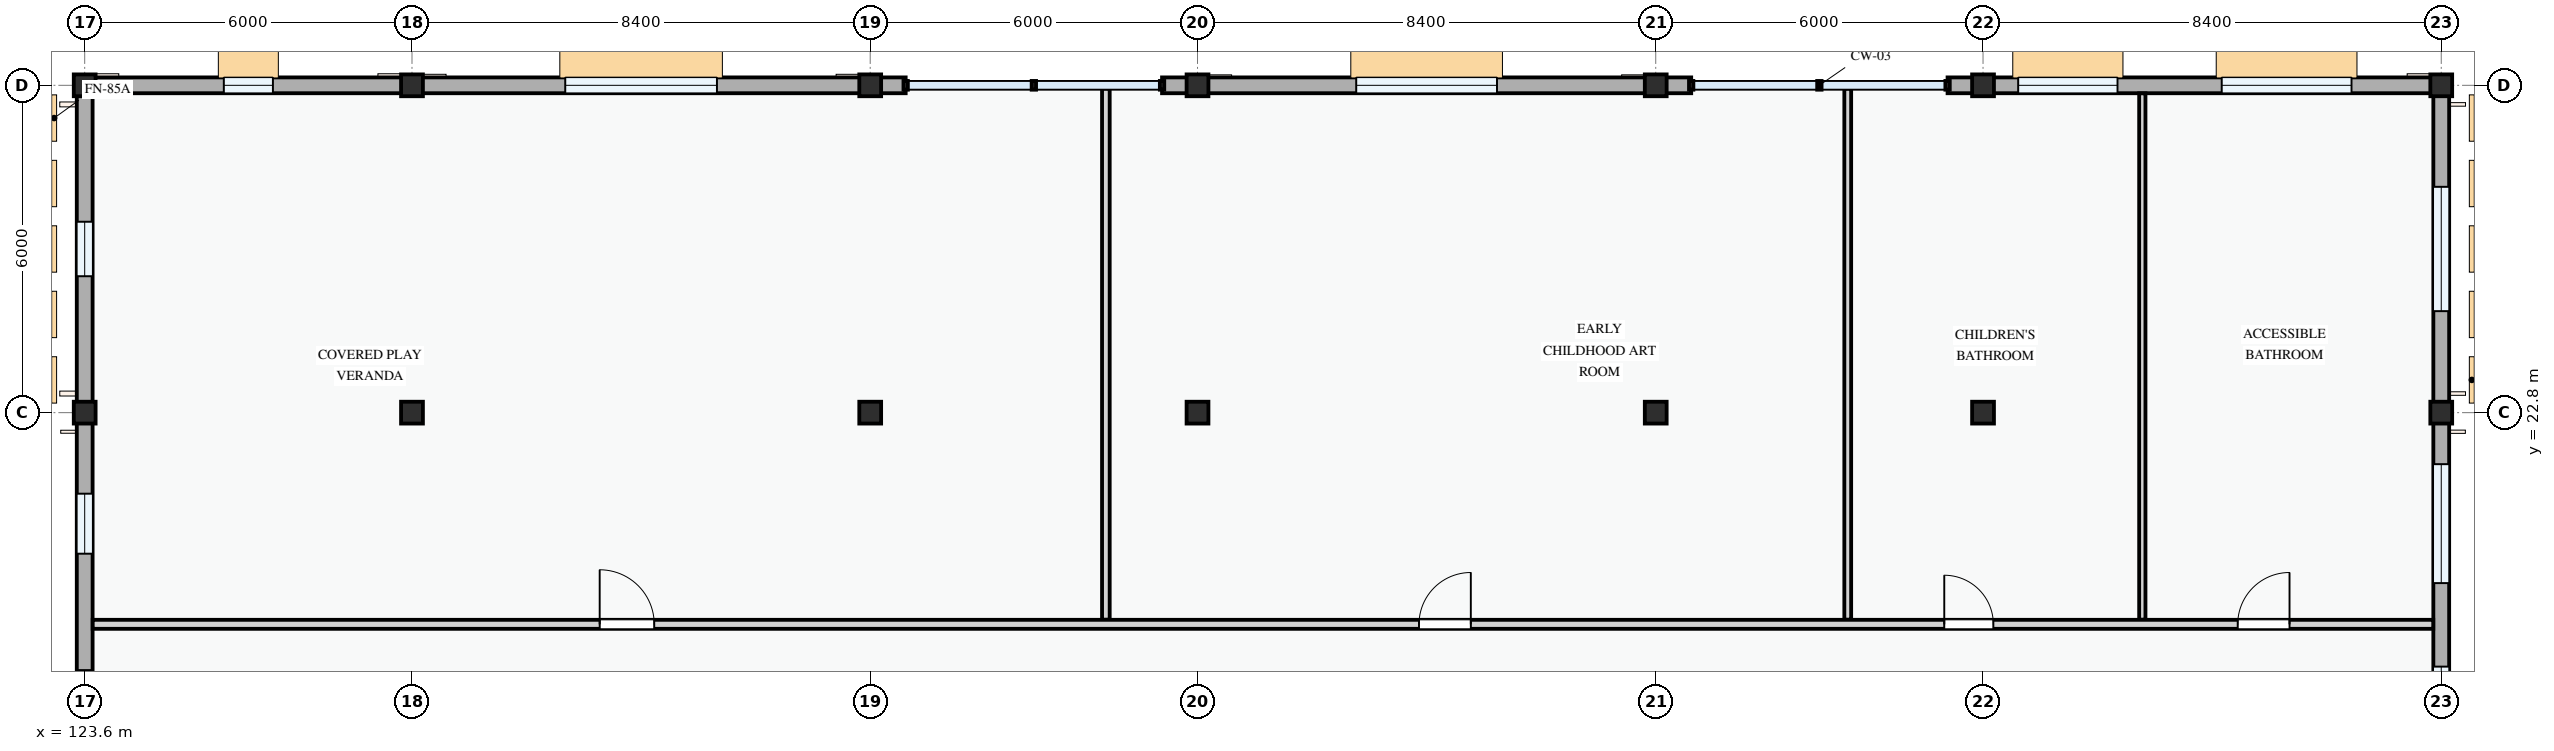
"""IFC4 building model, lengths in metres.
Left out: names, types, materials, properties, quantities, classifications, styles, units other than length and angle.
Written with IfcOpenShell. Run it as: python <this file> out.ifc"""

import sys

from ifc_helpers import new_model, si_unit, direction, frame, frame_2d, origin, origin_2d, place, context, subcontext, project, spatial, rectangle, extrude, element, fill, save


model = new_model("IFC4")
c1 = context("Model", 3, precision=1e-05, world=origin(), true_north=direction((0.0, 1.0)))
c2 = subcontext(c1, "Body", "Model", "MODEL_VIEW")
j1 = project(units=[si_unit("LENGTHUNIT", "METRE"), si_unit("PLANEANGLEUNIT", "RADIAN")], contexts=[c1])
p1 = place(None, origin())
s1 = spatial("IfcSite", under=j1, at=p1, CompositionType="ELEMENT")
p2 = place(p1, origin())
s2 = spatial("IfcBuilding", under=s1, at=p2, CompositionType="ELEMENT")
p3 = place(p2, frame((0.0, 0.0, 4.5)))
s3 = spatial("IfcBuildingStorey", under=s2, at=p3, CompositionType="ELEMENT", Elevation=4.5)
for number, where, z_axis, x_axis in (
    (1, (123.6, 22.8, 0.0), (0.0, 0.0, 1.0), (1.0, 0.0, 0.0)),
    (2, (123.6, 28.8, 0.0), (0.0, 0.0, 1.0), (1.0, 0.0, 0.0)),
    (3, (129.6, 22.8, 0.0), (0.0, 0.0, 1.0), (1.0, 0.0, 0.0)),
    (4, (129.6, 28.8, 0.0), (0.0, 0.0, 1.0), (1.0, 0.0, 0.0)),
    (5, (138.0, 22.8, 0.0), (0.0, 0.0, 1.0), (1.0, 0.0, 0.0)),
    (6, (138.0, 28.8, 0.0), (0.0, 0.0, 1.0), (1.0, 0.0, 0.0)),
    (7, (144.0, 22.8, 0.0), (0.0, 0.0, 1.0), (1.0, 0.0, 0.0)),
    (8, (144.0, 28.8, 0.0), (0.0, 0.0, 1.0), (1.0, 0.0, 0.0)),
    (9, (152.4, 22.8, 0.0), (0.0, 0.0, 1.0), (1.0, 0.0, 0.0)),
    (10, (152.4, 28.8, 0.0), (0.0, 0.0, 1.0), (1.0, 0.0, 0.0)),
    (11, (158.4, 22.8, 0.0), (0.0, 0.0, 1.0), (1.0, 0.0, 0.0)),
    (12, (158.4, 28.8, 0.0), (0.0, 0.0, 1.0), (1.0, 0.0, 0.0)),
    (13, (166.8, 22.8, 0.0), (0.0, 0.0, 1.0), (1.0, 0.0, 0.0)),
    (14, (166.8, 28.8, 0.0), (0.0, 0.0, 1.0), (1.0, 0.0, 0.0)),
):
    element("IfcColumn", number, at=place(p3, frame(where, z_axis=z_axis, x_axis=x_axis)), inside=s3, PredefinedType="COLUMN", context=c2, shape_type="SweptSolid", body=[
        extrude(rectangle(XDim=0.4, YDim=0.4, at=origin_2d()), origin(), (0.0, 0.0, 1.0), 3.6),
    ])
p4 = place(p3, frame((166.8, 14.4, 0.0), z_axis=(0.0, 0.0, 1.0), x_axis=(0.0, 1.0, 0.0)))
e15 = element("IfcWall", 15, at=p4, inside=s3, PredefinedType="STANDARD", context=c2, shape_type="SweptSolid", body=[
    extrude(rectangle(XDim=8.4, YDim=0.29, at=frame_2d((4.2, 0.0))), origin(), (0.0, 0.0, 1.0), 2.725),
])
p5 = place(p4, frame((2.195, 0.0, 0.72)))
e16 = element("IfcOpeningElement", 16, at=p5, cuts=e15, PredefinedType="OPENING", context=c2, shape_type="SweptSolid", body=[
    extrude(rectangle(XDim=1.55, YDim=1.4, at=frame_2d((0.775, 0.7))), frame((0.0, 0.155, 0.0), z_axis=(0.0, -1.0, 0.0), x_axis=(1.0, 0.0, 0.0)), (0.0, 0.0, 1.0), 0.31),
])
p6 = place(p4, frame((5.275, 0.0, 0.72)))
e17 = element("IfcOpeningElement", 17, at=p6, cuts=e15, PredefinedType="OPENING", context=c2, shape_type="SweptSolid", body=[
    extrude(rectangle(XDim=2.18, YDim=1.48, at=frame_2d((1.09, 0.74))), frame((0.0, 0.155, 0.0), z_axis=(0.0, -1.0, 0.0), x_axis=(1.0, 0.0, 0.0)), (0.0, 0.0, 1.0), 0.31),
])
p7 = place(p3, frame((166.8, 22.8, 0.0), z_axis=(0.0, 0.0, 1.0), x_axis=(0.0, 1.0, 0.0)))
e18 = element("IfcWall", 18, at=p7, inside=s3, PredefinedType="STANDARD", context=c2, shape_type="SweptSolid", body=[
    extrude(rectangle(XDim=6.0, YDim=0.29, at=frame_2d((3.0, 0.0))), origin(), (0.0, 0.0, 1.0), 2.875),
])
p8 = place(p7, frame((1.86, 0.0, 0.72)))
e19 = element("IfcOpeningElement", 19, at=p8, cuts=e18, PredefinedType="OPENING", context=c2, shape_type="SweptSolid", body=[
    extrude(rectangle(XDim=2.28, YDim=1.46, at=frame_2d((1.14, 0.73))), frame((0.0, 0.155, 0.0), z_axis=(0.0, -1.0, 0.0), x_axis=(1.0, 0.0, 0.0)), (0.0, 0.0, 1.0), 0.31),
])
p9 = place(p3, frame((166.8, 28.8, 0.0), z_axis=(0.0, 0.0, 1.0), x_axis=(-1.0, 0.0, 0.0)))
e20 = element("IfcWall", 20, at=p9, inside=s3, PredefinedType="STANDARD", context=c2, shape_type="SweptSolid", body=[
    extrude(rectangle(XDim=8.4, YDim=0.29, at=frame_2d((4.2, 0.0))), origin(), (0.0, 0.0, 1.0), 2.675),
])
p10 = place(p9, frame((1.645, 0.0, 0.72)))
e21 = element("IfcOpeningElement", 21, at=p10, cuts=e20, PredefinedType="OPENING", context=c2, shape_type="SweptSolid", body=[
    extrude(rectangle(XDim=2.38, YDim=1.48, at=frame_2d((1.19, 0.74))), frame((0.0, 0.155, 0.0), z_axis=(0.0, -1.0, 0.0), x_axis=(1.0, 0.0, 0.0)), (0.0, 0.0, 1.0), 0.31),
])
p11 = place(p9, frame((5.935, 0.0, 0.72)))
e22 = element("IfcOpeningElement", 22, at=p11, cuts=e20, PredefinedType="OPENING", context=c2, shape_type="SweptSolid", body=[
    extrude(rectangle(XDim=1.82, YDim=1.46, at=frame_2d((0.91, 0.73))), frame((0.0, 0.155, 0.0), z_axis=(0.0, -1.0, 0.0), x_axis=(1.0, 0.0, 0.0)), (0.0, 0.0, 1.0), 0.31),
])
p12 = place(p3, frame((158.4, 28.8, 0.0), z_axis=(0.0, 0.0, 1.0), x_axis=(-1.0, 0.0, 0.0)))
e23 = element("IfcWall", 23, at=p12, inside=s3, PredefinedType="STANDARD", context=c2, shape_type="SweptSolid", body=[
    extrude(rectangle(XDim=0.65, YDim=0.29, at=frame_2d((0.325, 0.0))), origin(), (0.0, 0.0, 1.0), 2.775),
])
p13 = place(p3, frame((153.05, 28.8, 0.0), z_axis=(0.0, 0.0, 1.0), x_axis=(-1.0, 0.0, 0.0)))
e24 = element("IfcWall", 24, at=p13, inside=s3, PredefinedType="STANDARD", context=c2, shape_type="SweptSolid", body=[
    extrude(rectangle(XDim=0.65, YDim=0.29, at=frame_2d((0.325, 0.0))), origin(), (0.0, 0.0, 1.0), 2.775),
])
p14 = place(p3, frame((152.4, 28.8, 0.0), z_axis=(0.0, 0.0, 1.0), x_axis=(-1.0, 0.0, 0.0)))
e25 = element("IfcWall", 25, at=p14, inside=s3, PredefinedType="STANDARD", context=c2, shape_type="SweptSolid", body=[
    extrude(rectangle(XDim=8.4, YDim=0.29, at=frame_2d((4.2, 0.0))), origin(), (0.0, 0.0, 1.0), 2.675),
])
p15 = place(p14, frame((2.91, 0.0, 0.72)))
e26 = element("IfcOpeningElement", 26, at=p15, cuts=e25, PredefinedType="OPENING", context=c2, shape_type="SweptSolid", body=[
    extrude(rectangle(XDim=2.58, YDim=1.48, at=frame_2d((1.29, 0.74))), frame((0.0, 0.155, 0.0), z_axis=(0.0, -1.0, 0.0), x_axis=(1.0, 0.0, 0.0)), (0.0, 0.0, 1.0), 0.31),
])
for number, where, z_axis, x_axis in (
    (27, (144.0, 28.8, 0.0), (0.0, 0.0, 1.0), (-1.0, 0.0, 0.0)),
    (28, (138.65, 28.8, 0.0), (0.0, 0.0, 1.0), (-1.0, 0.0, 0.0)),
):
    element("IfcWall", number, at=place(p3, frame(where, z_axis=z_axis, x_axis=x_axis)), inside=s3, PredefinedType="STANDARD", context=c2, shape_type="SweptSolid", body=[
        extrude(rectangle(XDim=0.65, YDim=0.29, at=frame_2d((0.325, 0.0))), origin(), (0.0, 0.0, 1.0), 2.775),
    ])
p16 = place(p3, frame((138.0, 28.8, 0.0), z_axis=(0.0, 0.0, 1.0), x_axis=(-1.0, 0.0, 0.0)))
e29 = element("IfcWall", 29, at=p16, inside=s3, PredefinedType="STANDARD", context=c2, shape_type="SweptSolid", body=[
    extrude(rectangle(XDim=8.4, YDim=0.29, at=frame_2d((4.2, 0.0))), origin(), (0.0, 0.0, 1.0), 2.675),
])
p17 = place(p16, frame((2.81, 0.0, 0.72)))
e30 = element("IfcOpeningElement", 30, at=p17, cuts=e29, PredefinedType="OPENING", context=c2, shape_type="SweptSolid", body=[
    extrude(rectangle(XDim=2.78, YDim=1.48, at=frame_2d((1.39, 0.74))), frame((0.0, 0.155, 0.0), z_axis=(0.0, -1.0, 0.0), x_axis=(1.0, 0.0, 0.0)), (0.0, 0.0, 1.0), 0.31),
])
p18 = place(p3, frame((129.6, 28.8, 0.0), z_axis=(0.0, 0.0, 1.0), x_axis=(-1.0, 0.0, 0.0)))
e31 = element("IfcWall", 31, at=p18, inside=s3, PredefinedType="STANDARD", context=c2, shape_type="SweptSolid", body=[
    extrude(rectangle(XDim=6.0, YDim=0.29, at=frame_2d((3.0, 0.0))), origin(), (0.0, 0.0, 1.0), 2.775),
])
p19 = place(p18, frame((2.55, 0.0, 0.72)))
e32 = element("IfcOpeningElement", 32, at=p19, cuts=e31, PredefinedType="OPENING", context=c2, shape_type="SweptSolid", body=[
    extrude(rectangle(XDim=0.9, YDim=1.2, at=frame_2d((0.45, 0.6))), frame((0.0, 0.155, 0.0), z_axis=(0.0, -1.0, 0.0), x_axis=(1.0, 0.0, 0.0)), (0.0, 0.0, 1.0), 0.31),
])
p20 = place(p3, frame((123.6, 28.8, 0.0), z_axis=(0.0, 0.0, 1.0), x_axis=(0.0, -1.0, 0.0)))
e33 = element("IfcWall", 33, at=p20, inside=s3, PredefinedType="STANDARD", context=c2, shape_type="SweptSolid", body=[
    extrude(rectangle(XDim=6.0, YDim=0.29, at=frame_2d((3.0, 0.0))), origin(), (0.0, 0.0, 1.0), 2.875),
])
p21 = place(p20, frame((2.5, 0.0, 0.72)))
e34 = element("IfcOpeningElement", 34, at=p21, cuts=e33, PredefinedType="OPENING", context=c2, shape_type="SweptSolid", body=[
    extrude(rectangle(XDim=1.0, YDim=1.25, at=frame_2d((0.5, 0.625))), frame((0.0, 0.155, 0.0), z_axis=(0.0, -1.0, 0.0), x_axis=(1.0, 0.0, 0.0)), (0.0, 0.0, 1.0), 0.31),
])
p22 = place(p3, frame((123.6, 22.8, 0.0), z_axis=(0.0, 0.0, 1.0), x_axis=(0.0, -1.0, 0.0)))
e35 = element("IfcWall", 35, at=p22, inside=s3, PredefinedType="STANDARD", context=c2, shape_type="SweptSolid", body=[
    extrude(rectangle(XDim=8.4, YDim=0.29, at=frame_2d((4.2, 0.0))), origin(), (0.0, 0.0, 1.0), 2.725),
])
p23 = place(p22, frame((1.485, 0.0, 0.72)))
e36 = element("IfcOpeningElement", 36, at=p23, cuts=e35, PredefinedType="OPENING", context=c2, shape_type="SweptSolid", body=[
    extrude(rectangle(XDim=1.1, YDim=1.3, at=frame_2d((0.55, 0.65))), frame((0.0, 0.155, 0.0), z_axis=(0.0, -1.0, 0.0), x_axis=(1.0, 0.0, 0.0)), (0.0, 0.0, 1.0), 0.31),
])
p24 = place(p22, frame((4.72, 0.0, 0.72)))
e37 = element("IfcOpeningElement", 37, at=p24, cuts=e35, PredefinedType="OPENING", context=c2, shape_type="SweptSolid", body=[
    extrude(rectangle(XDim=1.42, YDim=1.38, at=frame_2d((0.71, 0.69))), frame((0.0, 0.155, 0.0), z_axis=(0.0, -1.0, 0.0), x_axis=(1.0, 0.0, 0.0)), (0.0, 0.0, 1.0), 0.31),
])
p25 = place(p3, frame((142.32, 19.004, 0.0), z_axis=(0.0, 0.0, 1.0), x_axis=(0.0, 1.0, 0.0)))
e38 = element("IfcWall", 38, at=p25, inside=s3, PredefinedType="PARTITIONING", context=c2, shape_type="SweptSolid", body=[
    extrude(rectangle(XDim=9.736, YDim=0.14, at=frame_2d((4.868, 0.0))), origin(), (0.0, 0.0, 1.0), 3.3),
])
p26 = place(p3, frame((155.92, 19.004, 0.0), z_axis=(0.0, 0.0, 1.0), x_axis=(0.0, 1.0, 0.0)))
e39 = element("IfcWall", 39, at=p26, inside=s3, PredefinedType="PARTITIONING", context=c2, shape_type="SweptSolid", body=[
    extrude(rectangle(XDim=9.736, YDim=0.125, at=frame_2d((4.868, 0.0))), origin(), (0.0, 0.0, 1.0), 3.3),
])
p27 = place(p3, frame((161.32, 19.004, 0.0), z_axis=(0.0, 0.0, 1.0), x_axis=(0.0, 1.0, 0.0)))
e40 = element("IfcWall", 40, at=p27, inside=s3, PredefinedType="PARTITIONING", context=c2, shape_type="SweptSolid", body=[
    extrude(rectangle(XDim=9.649, YDim=0.115, at=frame_2d((4.824, 0.0))), origin(), (0.0, 0.0, 1.0), 3.3),
])
p28 = place(p3, frame((123.747, 18.92, 0.0), z_axis=(0.0, 0.0, 1.0), x_axis=(1.0, 0.0, 0.0)))
e41 = element("IfcWall", 41, at=p28, inside=s3, PredefinedType="PARTITIONING", context=c2, shape_type="SweptSolid", body=[
    extrude(rectangle(XDim=42.906, YDim=0.165, at=frame_2d((21.453, 0.0))), origin(), (0.0, 0.0, 1.0), 3.3),
])
p29 = place(p28, frame((9.294, 0.0, 0.0)))
e42 = element("IfcOpeningElement", 42, at=p29, cuts=e41, PredefinedType="OPENING", context=c2, shape_type="SweptSolid", body=[
    extrude(rectangle(XDim=1.0, YDim=2.1, at=frame_2d((0.5, 1.05))), frame((0.0, 0.093, 0.0), z_axis=(0.0, -1.0, 0.0), x_axis=(1.0, 0.0, 0.0)), (0.0, 0.0, 1.0), 0.185),
])
p30 = place(p28, frame((24.313, 0.0, 0.0)))
e43 = element("IfcOpeningElement", 43, at=p30, cuts=e41, PredefinedType="OPENING", context=c2, shape_type="SweptSolid", body=[
    extrude(rectangle(XDim=0.95, YDim=2.1, at=frame_2d((0.475, 1.05))), frame((0.0, 0.093, 0.0), z_axis=(0.0, -1.0, 0.0), x_axis=(1.0, 0.0, 0.0)), (0.0, 0.0, 1.0), 0.185),
])
p31 = place(p28, frame((33.942, 0.0, 0.0)))
e44 = element("IfcOpeningElement", 44, at=p31, cuts=e41, PredefinedType="OPENING", context=c2, shape_type="SweptSolid", body=[
    extrude(rectangle(XDim=0.9, YDim=2.1, at=frame_2d((0.45, 1.05))), frame((0.0, 0.093, 0.0), z_axis=(0.0, -1.0, 0.0), x_axis=(1.0, 0.0, 0.0)), (0.0, 0.0, 1.0), 0.185),
])
p32 = place(p28, frame((39.322, 0.0, 0.0)))
e45 = element("IfcOpeningElement", 45, at=p32, cuts=e41, PredefinedType="OPENING", context=c2, shape_type="SweptSolid", body=[
    extrude(rectangle(XDim=0.95, YDim=2.1, at=frame_2d((0.475, 1.05))), frame((0.0, 0.093, 0.0), z_axis=(0.0, -1.0, 0.0), x_axis=(1.0, 0.0, 0.0)), (0.0, 0.0, 1.0), 0.185),
])
p33 = place(p5, origin())
e46 = element("IfcWindow", 46, at=p33, inside=s3, PartitioningType="SINGLE_PANEL", PredefinedType="WINDOW", context=c2, shape_type="SweptSolid", body=[
    extrude(rectangle(XDim=1.55, YDim=1.4, at=frame_2d((0.775, 0.7))), frame((0.0, 0.03, 0.0), z_axis=(0.0, -1.0, 0.0), x_axis=(1.0, 0.0, 0.0)), (0.0, 0.0, 1.0), 0.06),
])
fill(e16, e46)
p34 = place(p6, origin())
e47 = element("IfcWindow", 47, at=p34, inside=s3, PartitioningType="DOUBLE_PANEL_VERTICAL", PredefinedType="WINDOW", context=c2, shape_type="SweptSolid", body=[
    extrude(rectangle(XDim=2.18, YDim=1.48, at=frame_2d((1.09, 0.74))), frame((0.0, 0.03, 0.0), z_axis=(0.0, -1.0, 0.0), x_axis=(1.0, 0.0, 0.0)), (0.0, 0.0, 1.0), 0.06),
])
fill(e17, e47)
p35 = place(p8, origin())
e48 = element("IfcWindow", 48, at=p35, inside=s3, PartitioningType="DOUBLE_PANEL_VERTICAL", PredefinedType="WINDOW", context=c2, shape_type="SweptSolid", body=[
    extrude(rectangle(XDim=2.28, YDim=1.46, at=frame_2d((1.14, 0.73))), frame((0.0, 0.03, 0.0), z_axis=(0.0, -1.0, 0.0), x_axis=(1.0, 0.0, 0.0)), (0.0, 0.0, 1.0), 0.06),
])
fill(e19, e48)
p36 = place(p10, origin())
e49 = element("IfcWindow", 49, at=p36, inside=s3, PartitioningType="DOUBLE_PANEL_VERTICAL", PredefinedType="WINDOW", context=c2, shape_type="SweptSolid", body=[
    extrude(rectangle(XDim=2.38, YDim=1.48, at=frame_2d((1.19, 0.74))), frame((0.0, 0.03, 0.0), z_axis=(0.0, -1.0, 0.0), x_axis=(1.0, 0.0, 0.0)), (0.0, 0.0, 1.0), 0.06),
])
fill(e21, e49)
p37 = place(p11, origin())
e50 = element("IfcWindow", 50, at=p37, inside=s3, PartitioningType="DOUBLE_PANEL_VERTICAL", PredefinedType="WINDOW", context=c2, shape_type="SweptSolid", body=[
    extrude(rectangle(XDim=1.82, YDim=1.46, at=frame_2d((0.91, 0.73))), frame((0.0, 0.03, 0.0), z_axis=(0.0, -1.0, 0.0), x_axis=(1.0, 0.0, 0.0)), (0.0, 0.0, 1.0), 0.06),
])
fill(e22, e50)
p38 = place(p15, origin())
e51 = element("IfcWindow", 51, at=p38, inside=s3, PartitioningType="DOUBLE_PANEL_VERTICAL", PredefinedType="WINDOW", context=c2, shape_type="SweptSolid", body=[
    extrude(rectangle(XDim=2.58, YDim=1.48, at=frame_2d((1.29, 0.74))), frame((0.0, 0.03, 0.0), z_axis=(0.0, -1.0, 0.0), x_axis=(1.0, 0.0, 0.0)), (0.0, 0.0, 1.0), 0.06),
])
fill(e26, e51)
p39 = place(p17, origin())
e52 = element("IfcWindow", 52, at=p39, inside=s3, PartitioningType="DOUBLE_PANEL_VERTICAL", PredefinedType="WINDOW", context=c2, shape_type="SweptSolid", body=[
    extrude(rectangle(XDim=2.78, YDim=1.48, at=frame_2d((1.39, 0.74))), frame((0.0, 0.03, 0.0), z_axis=(0.0, -1.0, 0.0), x_axis=(1.0, 0.0, 0.0)), (0.0, 0.0, 1.0), 0.06),
])
fill(e30, e52)
p40 = place(p19, origin())
e53 = element("IfcWindow", 53, at=p40, inside=s3, PartitioningType="SINGLE_PANEL", PredefinedType="WINDOW", context=c2, shape_type="SweptSolid", body=[
    extrude(rectangle(XDim=0.9, YDim=1.2, at=frame_2d((0.45, 0.6))), frame((0.0, 0.03, 0.0), z_axis=(0.0, -1.0, 0.0), x_axis=(1.0, 0.0, 0.0)), (0.0, 0.0, 1.0), 0.06),
])
fill(e32, e53)
p41 = place(p21, origin())
e54 = element("IfcWindow", 54, at=p41, inside=s3, PartitioningType="SINGLE_PANEL", PredefinedType="WINDOW", context=c2, shape_type="SweptSolid", body=[
    extrude(rectangle(XDim=1.0, YDim=1.25, at=frame_2d((0.5, 0.625))), frame((0.0, 0.03, 0.0), z_axis=(0.0, -1.0, 0.0), x_axis=(1.0, 0.0, 0.0)), (0.0, 0.0, 1.0), 0.06),
])
fill(e34, e54)
p42 = place(p23, origin())
e55 = element("IfcWindow", 55, at=p42, inside=s3, PartitioningType="SINGLE_PANEL", PredefinedType="WINDOW", context=c2, shape_type="SweptSolid", body=[
    extrude(rectangle(XDim=1.1, YDim=1.3, at=frame_2d((0.55, 0.65))), frame((0.0, 0.03, 0.0), z_axis=(0.0, -1.0, 0.0), x_axis=(1.0, 0.0, 0.0)), (0.0, 0.0, 1.0), 0.06),
])
fill(e36, e55)
p43 = place(p24, origin())
e56 = element("IfcWindow", 56, at=p43, inside=s3, PartitioningType="SINGLE_PANEL", PredefinedType="WINDOW", context=c2, shape_type="SweptSolid", body=[
    extrude(rectangle(XDim=1.42, YDim=1.38, at=frame_2d((0.71, 0.69))), frame((0.0, 0.03, 0.0), z_axis=(0.0, -1.0, 0.0), x_axis=(1.0, 0.0, 0.0)), (0.0, 0.0, 1.0), 0.06),
])
fill(e37, e56)
p44 = place(p29, origin())
e57 = element("IfcDoor", 57, at=p44, inside=s3, OperationType="SINGLE_SWING_LEFT", PredefinedType="DOOR", context=c2, shape_type="SweptSolid", body=[
    extrude(rectangle(XDim=1.0, YDim=2.1, at=frame_2d((0.5, 1.05))), frame((0.0, 0.025, 0.0), z_axis=(0.0, -1.0, 0.0), x_axis=(1.0, 0.0, 0.0)), (0.0, 0.0, 1.0), 0.05),
])
fill(e42, e57)
p45 = place(p30, origin())
e58 = element("IfcDoor", 58, at=p45, inside=s3, OperationType="SINGLE_SWING_RIGHT", PredefinedType="DOOR", context=c2, shape_type="SweptSolid", body=[
    extrude(rectangle(XDim=0.95, YDim=2.1, at=frame_2d((0.475, 1.05))), frame((0.0, 0.025, 0.0), z_axis=(0.0, -1.0, 0.0), x_axis=(1.0, 0.0, 0.0)), (0.0, 0.0, 1.0), 0.05),
])
fill(e43, e58)
p46 = place(p31, origin())
e59 = element("IfcDoor", 59, at=p46, inside=s3, OperationType="SINGLE_SWING_LEFT", PredefinedType="DOOR", context=c2, shape_type="SweptSolid", body=[
    extrude(rectangle(XDim=0.9, YDim=2.1, at=frame_2d((0.45, 1.05))), frame((0.0, 0.025, 0.0), z_axis=(0.0, -1.0, 0.0), x_axis=(1.0, 0.0, 0.0)), (0.0, 0.0, 1.0), 0.05),
])
fill(e44, e59)
p47 = place(p32, origin())
e60 = element("IfcDoor", 60, at=p47, inside=s3, OperationType="SINGLE_SWING_RIGHT", PredefinedType="DOOR", context=c2, shape_type="SweptSolid", body=[
    extrude(rectangle(XDim=0.95, YDim=2.1, at=frame_2d((0.475, 1.05))), frame((0.0, 0.025, 0.0), z_axis=(0.0, -1.0, 0.0), x_axis=(1.0, 0.0, 0.0)), (0.0, 0.0, 1.0), 0.05),
])
fill(e45, e60)
save(model, sys.argv[1])
